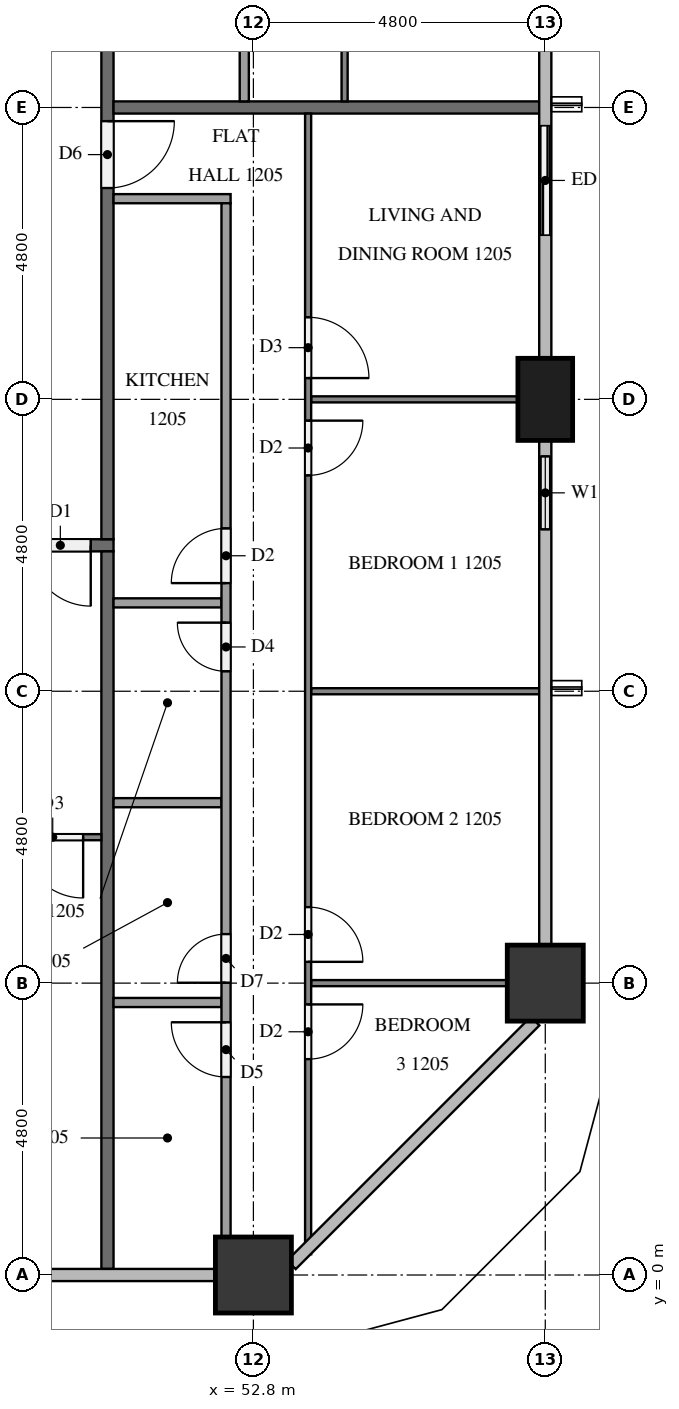
"""IFC4 building model, lengths in metres.
Left out: names, types, materials, properties, quantities, classifications, styles, units other than length and angle.
Written with IfcOpenShell. Run it as: python <this file> out.ifc"""

import sys

from ifc_helpers import new_model, si_unit, direction, frame, frame_2d, origin, origin_2d, place, context, subcontext, project, spatial, rectangle, extrude, element, fill, save


model = new_model("IFC4")
c1 = context("Model", 3, precision=1e-05, world=origin(), true_north=direction((0.0, 1.0)))
c2 = subcontext(c1, "Body", "Model", "MODEL_VIEW")
j1 = project(units=[si_unit("LENGTHUNIT", "METRE"), si_unit("PLANEANGLEUNIT", "RADIAN")], contexts=[c1])
p1 = place(None, origin())
s1 = spatial("IfcSite", under=j1, at=p1, CompositionType="ELEMENT")
p2 = place(p1, origin())
s2 = spatial("IfcBuilding", under=s1, at=p2, CompositionType="ELEMENT")
p3 = place(p2, frame((0.0, 0.0, 50.4)))
s3 = spatial("IfcBuildingStorey", under=s2, at=p3, CompositionType="ELEMENT", Elevation=50.4)
for number, where, z_axis, x_axis in (
    (1, (52.8, 0.0, 0.0), (0.0, 0.0, 1.0), (1.0, 0.0, 0.0)),
    (2, (57.6, 4.8, 0.0), (0.0, 0.0, 1.0), (1.0, 0.0, 0.0)),
):
    element("IfcColumn", number, at=place(p3, frame(where, z_axis=z_axis, x_axis=x_axis)), inside=s3, PredefinedType="COLUMN", context=c2, shape_type="SweptSolid", body=[
        extrude(rectangle(XDim=1.25, YDim=1.25, at=origin_2d()), origin(), (0.0, 0.0, 1.0), 3.1),
    ])
p4 = place(p3, frame((57.6, 14.4, 0.0), z_axis=(0.0, 0.0, 1.0), x_axis=(0.0, 1.0, 0.0)))
e3 = element("IfcColumn", 3, at=p4, inside=s3, PredefinedType="COLUMN", context=c2, shape_type="SweptSolid", body=[
    extrude(rectangle(XDim=1.35, YDim=0.9, at=origin_2d()), origin(), (0.0, 0.0, 1.0), 3.1),
])
p5 = place(p3, frame((57.6, 12.0, 0.0), z_axis=(0.0, 0.0, 1.0), x_axis=(0.0, 1.0, 0.0)))
e4 = element("IfcWall", 4, at=p5, inside=s3, PredefinedType="SOLIDWALL", context=c2, shape_type="SweptSolid", body=[
    extrude(rectangle(XDim=1.725, YDim=0.15, at=frame_2d((0.863, 0.0))), origin(), (0.0, 0.0, 1.0), 3.1),
])
p6 = place(p5, frame((0.262, 0.0, 0.9)))
e5 = element("IfcOpeningElement", 5, at=p6, cuts=e4, PredefinedType="OPENING", context=c2, shape_type="SweptSolid", body=[
    extrude(rectangle(XDim=1.2, YDim=1.4, at=frame_2d((0.6, 0.7))), frame((0.0, 0.085, 0.0), z_axis=(0.0, -1.0, 0.0), x_axis=(1.0, 0.0, 0.0)), (0.0, 0.0, 1.0), 0.17),
])
p7 = place(p3, frame((57.6, 16.8, 0.0), z_axis=(0.0, 0.0, 1.0), x_axis=(0.0, 1.0, 0.0)))
e6 = element("IfcWall", 6, at=p7, inside=s3, PredefinedType="SOLIDWALL", context=c2, shape_type="SweptSolid", body=[
    extrude(rectangle(XDim=2.4, YDim=0.15, at=frame_2d((1.2, 0.0))), origin(), (0.0, 0.0, 1.0), 3.1),
])
p8 = place(p7, frame((0.3, 0.0, 0.0)))
e7 = element("IfcOpeningElement", 7, at=p8, cuts=e6, PredefinedType="OPENING", context=c2, shape_type="SweptSolid", body=[
    extrude(rectangle(XDim=1.8, YDim=2.4, at=frame_2d((0.9, 1.2))), frame((0.0, 0.085, 0.0), z_axis=(0.0, -1.0, 0.0), x_axis=(1.0, 0.0, 0.0)), (0.0, 0.0, 1.0), 0.17),
])
p9 = place(p3, frame((50.5, 12.0, 0.0), z_axis=(0.0, 0.0, 1.0), x_axis=(-1.0, 0.0, 0.0)))
e8 = element("IfcWall", 8, at=p9, inside=s3, PredefinedType="PARTITIONING", context=c2, shape_type="SweptSolid", body=[
    extrude(rectangle(XDim=38.6, YDim=0.2, at=frame_2d((19.3, 0.0))), origin(), (0.0, 0.0, 1.0), 3.1),
])
p10 = place(p9, frame((36.375, 0.0, 0.0)))
e9 = element("IfcOpeningElement", 9, at=p10, cuts=e8, PredefinedType="OPENING", context=c2, shape_type="SweptSolid", body=[
    extrude(rectangle(XDim=1.0, YDim=2.1, at=frame_2d((0.5, 1.05))), frame((0.0, 0.11, 0.0), z_axis=(0.0, -1.0, 0.0), x_axis=(1.0, 0.0, 0.0)), (0.0, 0.0, 1.0), 0.22),
])
p11 = place(p9, frame((19.575, 0.0, 0.0)))
e10 = element("IfcOpeningElement", 10, at=p11, cuts=e8, PredefinedType="OPENING", context=c2, shape_type="SweptSolid", body=[
    extrude(rectangle(XDim=1.0, YDim=2.1, at=frame_2d((0.5, 1.05))), frame((0.0, 0.11, 0.0), z_axis=(0.0, -1.0, 0.0), x_axis=(1.0, 0.0, 0.0)), (0.0, 0.0, 1.0), 0.22),
])
p12 = place(p9, frame((7.575, 0.0, 0.0)))
e11 = element("IfcOpeningElement", 11, at=p12, cuts=e8, PredefinedType="OPENING", context=c2, shape_type="SweptSolid", body=[
    extrude(rectangle(XDim=1.0, YDim=2.1, at=frame_2d((0.5, 1.05))), frame((0.0, 0.11, 0.0), z_axis=(0.0, -1.0, 0.0), x_axis=(1.0, 0.0, 0.0)), (0.0, 0.0, 1.0), 0.22),
])
p13 = place(p9, frame((0.375, 0.0, 0.0)))
e12 = element("IfcOpeningElement", 12, at=p13, cuts=e8, PredefinedType="OPENING", context=c2, shape_type="SweptSolid", body=[
    extrude(rectangle(XDim=1.0, YDim=2.1, at=frame_2d((0.5, 1.05))), frame((0.0, 0.11, 0.0), z_axis=(0.0, -1.0, 0.0), x_axis=(1.0, 0.0, 0.0)), (0.0, 0.0, 1.0), 0.22),
])
p14 = place(p3, frame((50.4, 40.7, 0.0), z_axis=(0.0, 0.0, 1.0), x_axis=(0.0, -1.0, 0.0)))
e13 = element("IfcWall", 13, at=p14, inside=s3, PredefinedType="PARTITIONING", context=c2, shape_type="SweptSolid", body=[
    extrude(rectangle(XDim=28.6, YDim=0.2, at=frame_2d((14.3, 0.0))), origin(), (0.0, 0.0, 1.0), 3.1),
])
p15 = place(p14, frame((21.725, 0.0, 0.0)))
e14 = element("IfcOpeningElement", 14, at=p15, cuts=e13, PredefinedType="OPENING", context=c2, shape_type="SweptSolid", body=[
    extrude(rectangle(XDim=1.1, YDim=2.1, at=frame_2d((0.55, 1.05))), frame((0.0, 0.11, 0.0), z_axis=(0.0, -1.0, 0.0), x_axis=(1.0, 0.0, 0.0)), (0.0, 0.0, 1.0), 0.22),
])
p16 = place(p14, frame((12.175, 0.0, 0.0)))
e15 = element("IfcOpeningElement", 15, at=p16, cuts=e13, PredefinedType="OPENING", context=c2, shape_type="SweptSolid", body=[
    extrude(rectangle(XDim=1.0, YDim=2.1, at=frame_2d((0.5, 1.05))), frame((0.0, 0.11, 0.0), z_axis=(0.0, -1.0, 0.0), x_axis=(1.0, 0.0, 0.0)), (0.0, 0.0, 1.0), 0.22),
])
p17 = place(p14, frame((10.625, 0.0, 0.0)))
e16 = element("IfcOpeningElement", 16, at=p17, cuts=e13, PredefinedType="OPENING", context=c2, shape_type="SweptSolid", body=[
    extrude(rectangle(XDim=1.0, YDim=2.1, at=frame_2d((0.5, 1.05))), frame((0.0, 0.11, 0.0), z_axis=(0.0, -1.0, 0.0), x_axis=(1.0, 0.0, 0.0)), (0.0, 0.0, 1.0), 0.22),
])
p18 = place(p3, frame((50.4, 11.9, 0.0), z_axis=(0.0, 0.0, 1.0), x_axis=(0.0, -1.0, 0.0)))
e17 = element("IfcWall", 17, at=p18, inside=s3, PredefinedType="PARTITIONING", context=c2, shape_type="SweptSolid", body=[
    extrude(rectangle(XDim=11.8, YDim=0.2, at=frame_2d((5.9, 0.0))), origin(), (0.0, 0.0, 1.0), 3.1),
])
p19 = place(p3, frame((50.5, 19.2, 0.0), z_axis=(0.0, 0.0, 1.0), x_axis=(1.0, 0.0, 0.0)))
e18 = element("IfcWall", 18, at=p19, inside=s3, PredefinedType="PARTITIONING", context=c2, shape_type="SweptSolid", body=[
    extrude(rectangle(XDim=7.0, YDim=0.2, at=frame_2d((3.5, 0.0))), origin(), (0.0, 0.0, 1.0), 3.1),
])
p20 = place(p3, frame((50.3, 7.2, 0.0), z_axis=(0.0, 0.0, 1.0), x_axis=(-1.0, 0.0, 0.0)))
e19 = element("IfcWall", 19, at=p20, inside=s3, PredefinedType="PARTITIONING", context=c2, shape_type="SweptSolid", body=[
    extrude(rectangle(XDim=7.0, YDim=0.1, at=frame_2d((3.5, 0.0))), origin(), (0.0, 0.0, 1.0), 3.1),
])
p21 = place(p20, frame((0.3, 0.0, 0.0)))
e20 = element("IfcOpeningElement", 20, at=p21, cuts=e19, PredefinedType="OPENING", context=c2, shape_type="SweptSolid", body=[
    extrude(rectangle(XDim=1.0, YDim=2.1, at=frame_2d((0.5, 1.05))), frame((0.0, 0.06, 0.0), z_axis=(0.0, -1.0, 0.0), x_axis=(1.0, 0.0, 0.0)), (0.0, 0.0, 1.0), 0.12),
])
p22 = place(p3, frame((53.75, 14.4, 0.0), z_axis=(0.0, 0.0, 1.0), x_axis=(1.0, 0.0, 0.0)))
e21 = element("IfcWall", 21, at=p22, inside=s3, PredefinedType="PARTITIONING", context=c2, shape_type="SweptSolid", body=[
    extrude(rectangle(XDim=3.4, YDim=0.1, at=frame_2d((1.7, 0.0))), origin(), (0.0, 0.0, 1.0), 3.1),
])
p23 = place(p3, frame((53.75, 9.6, 0.0), z_axis=(0.0, 0.0, 1.0), x_axis=(1.0, 0.0, 0.0)))
e22 = element("IfcWall", 22, at=p23, inside=s3, PredefinedType="PARTITIONING", context=c2, shape_type="SweptSolid", body=[
    extrude(rectangle(XDim=3.75, YDim=0.1, at=frame_2d((1.875, 0.0))), origin(), (0.0, 0.0, 1.0), 3.1),
])
p24 = place(p3, frame((53.75, 4.8, 0.0), z_axis=(0.0, 0.0, 1.0), x_axis=(1.0, 0.0, 0.0)))
e23 = element("IfcWall", 23, at=p24, inside=s3, PredefinedType="PARTITIONING", context=c2, shape_type="SweptSolid", body=[
    extrude(rectangle(XDim=3.225, YDim=0.1, at=frame_2d((1.613, 0.0))), origin(), (0.0, 0.0, 1.0), 3.1),
])
p25 = place(p3, frame((53.7, 19.1, 0.0), z_axis=(0.0, 0.0, 1.0), x_axis=(0.0, -1.0, 0.0)))
e24 = element("IfcWall", 24, at=p25, inside=s3, PredefinedType="PARTITIONING", context=c2, shape_type="SweptSolid", body=[
    extrude(rectangle(XDim=18.759, YDim=0.1, at=frame_2d((9.379, 0.0))), origin(), (0.0, 0.0, 1.0), 3.1),
])
p26 = place(p25, frame((3.35, 0.0, 0.0)))
e25 = element("IfcOpeningElement", 25, at=p26, cuts=e24, PredefinedType="OPENING", context=c2, shape_type="SweptSolid", body=[
    extrude(rectangle(XDim=1.0, YDim=2.1, at=frame_2d((0.5, 1.05))), frame((0.0, 0.06, 0.0), z_axis=(0.0, -1.0, 0.0), x_axis=(1.0, 0.0, 0.0)), (0.0, 0.0, 1.0), 0.12),
])
p27 = place(p25, frame((5.05, 0.0, 0.0)))
e26 = element("IfcOpeningElement", 26, at=p27, cuts=e24, PredefinedType="OPENING", context=c2, shape_type="SweptSolid", body=[
    extrude(rectangle(XDim=0.9, YDim=2.1, at=frame_2d((0.45, 1.05))), frame((0.0, 0.06, 0.0), z_axis=(0.0, -1.0, 0.0), x_axis=(1.0, 0.0, 0.0)), (0.0, 0.0, 1.0), 0.12),
])
p28 = place(p25, frame((13.05, 0.0, 0.0)))
e27 = element("IfcOpeningElement", 27, at=p28, cuts=e24, PredefinedType="OPENING", context=c2, shape_type="SweptSolid", body=[
    extrude(rectangle(XDim=0.9, YDim=2.1, at=frame_2d((0.45, 1.05))), frame((0.0, 0.06, 0.0), z_axis=(0.0, -1.0, 0.0), x_axis=(1.0, 0.0, 0.0)), (0.0, 0.0, 1.0), 0.12),
])
p29 = place(p25, frame((14.65, 0.0, 0.0)))
e28 = element("IfcOpeningElement", 28, at=p29, cuts=e24, PredefinedType="OPENING", context=c2, shape_type="SweptSolid", body=[
    extrude(rectangle(XDim=0.9, YDim=2.1, at=frame_2d((0.45, 1.05))), frame((0.0, 0.06, 0.0), z_axis=(0.0, -1.0, 0.0), x_axis=(1.0, 0.0, 0.0)), (0.0, 0.0, 1.0), 0.12),
])
for number, where, z_axis, x_axis in (
    (29, (50.5, 11.053, 0.0), (0.0, 0.0, 1.0), (1.0, 0.0, 0.0)),
    (30, (50.5, 7.767, 0.0), (0.0, 0.0, 1.0), (1.0, 0.0, 0.0)),
    (31, (50.5, 4.481, 0.0), (0.0, 0.0, 1.0), (1.0, 0.0, 0.0)),
):
    element("IfcWall", number, at=place(p3, frame(where, z_axis=z_axis, x_axis=x_axis)), inside=s3, PredefinedType="PARTITIONING", context=c2, shape_type="SweptSolid", body=[
        extrude(rectangle(XDim=1.775, YDim=0.15, at=frame_2d((0.887, 0.0))), origin(), (0.0, 0.0, 1.0), 3.1),
    ])
p30 = place(p3, frame((50.5, 17.7, 0.0), z_axis=(0.0, 0.0, 1.0), x_axis=(1.0, 0.0, 0.0)))
e32 = element("IfcWall", 32, at=p30, inside=s3, PredefinedType="PARTITIONING", context=c2, shape_type="SweptSolid", body=[
    extrude(rectangle(XDim=1.925, YDim=0.15, at=frame_2d((0.962, 0.0))), origin(), (0.0, 0.0, 1.0), 3.1),
])
p31 = place(p3, frame((52.35, 0.625, 0.0), z_axis=(0.0, 0.0, 1.0), x_axis=(0.0, 1.0, 0.0)))
e33 = element("IfcWall", 33, at=p31, inside=s3, PredefinedType="PARTITIONING", context=c2, shape_type="SweptSolid", body=[
    extrude(rectangle(XDim=17.0, YDim=0.15, at=frame_2d((8.5, 0.0))), origin(), (0.0, 0.0, 1.0), 3.1),
])
p32 = place(p31, frame((10.753, 0.0, 0.0)))
e34 = element("IfcOpeningElement", 34, at=p32, cuts=e33, PredefinedType="OPENING", context=c2, shape_type="SweptSolid", body=[
    extrude(rectangle(XDim=0.9, YDim=2.1, at=frame_2d((0.45, 1.05))), frame((0.0, 0.085, 0.0), z_axis=(0.0, -1.0, 0.0), x_axis=(1.0, 0.0, 0.0)), (0.0, 0.0, 1.0), 0.17),
])
p33 = place(p31, frame((9.303, 0.0, 0.0)))
e35 = element("IfcOpeningElement", 35, at=p33, cuts=e33, PredefinedType="OPENING", context=c2, shape_type="SweptSolid", body=[
    extrude(rectangle(XDim=0.8, YDim=2.1, at=frame_2d((0.4, 1.05))), frame((0.0, 0.085, 0.0), z_axis=(0.0, -1.0, 0.0), x_axis=(1.0, 0.0, 0.0)), (0.0, 0.0, 1.0), 0.17),
])
p34 = place(p31, frame((4.181, 0.0, 0.0)))
e36 = element("IfcOpeningElement", 36, at=p34, cuts=e33, PredefinedType="OPENING", context=c2, shape_type="SweptSolid", body=[
    extrude(rectangle(XDim=0.8, YDim=2.1, at=frame_2d((0.4, 1.05))), frame((0.0, 0.085, 0.0), z_axis=(0.0, -1.0, 0.0), x_axis=(1.0, 0.0, 0.0)), (0.0, 0.0, 1.0), 0.17),
])
p35 = place(p31, frame((2.631, 0.0, 0.0)))
e37 = element("IfcOpeningElement", 37, at=p35, cuts=e33, PredefinedType="OPENING", context=c2, shape_type="SweptSolid", body=[
    extrude(rectangle(XDim=0.9, YDim=2.1, at=frame_2d((0.45, 1.05))), frame((0.0, 0.085, 0.0), z_axis=(0.0, -1.0, 0.0), x_axis=(1.0, 0.0, 0.0)), (0.0, 0.0, 1.0), 0.17),
])
p36 = place(p3, frame((54.3, 28.7, 0.0), z_axis=(0.0, 0.0, 1.0), x_axis=(0.0, -1.0, 0.0)))
e38 = element("IfcWall", 38, at=p36, inside=s3, PredefinedType="PARTITIONING", context=c2, shape_type="SweptSolid", body=[
    extrude(rectangle(XDim=9.4, YDim=0.1, at=frame_2d((4.7, 0.0))), origin(), (0.0, 0.0, 1.0), 3.1),
])
p37 = place(p36, frame((3.35, 0.0, 0.0)))
e39 = element("IfcOpeningElement", 39, at=p37, cuts=e38, PredefinedType="OPENING", context=c2, shape_type="SweptSolid", body=[
    extrude(rectangle(XDim=1.0, YDim=2.1, at=frame_2d((0.5, 1.05))), frame((0.0, 0.06, 0.0), z_axis=(0.0, -1.0, 0.0), x_axis=(1.0, 0.0, 0.0)), (0.0, 0.0, 1.0), 0.12),
])
p38 = place(p36, frame((5.05, 0.0, 0.0)))
e40 = element("IfcOpeningElement", 40, at=p38, cuts=e38, PredefinedType="OPENING", context=c2, shape_type="SweptSolid", body=[
    extrude(rectangle(XDim=0.9, YDim=2.1, at=frame_2d((0.45, 1.05))), frame((0.0, 0.06, 0.0), z_axis=(0.0, -1.0, 0.0), x_axis=(1.0, 0.0, 0.0)), (0.0, 0.0, 1.0), 0.12),
])
p39 = place(p3, frame((52.65, 19.3, 0.0), z_axis=(0.0, 0.0, 1.0), x_axis=(0.0, 1.0, 0.0)))
e41 = element("IfcWall", 41, at=p39, inside=s3, PredefinedType="PARTITIONING", context=c2, shape_type="SweptSolid", body=[
    extrude(rectangle(XDim=7.925, YDim=0.15, at=frame_2d((3.962, 0.0))), origin(), (0.0, 0.0, 1.0), 3.1),
])
p40 = place(p39, frame((3.495, 0.0, 0.0)))
e42 = element("IfcOpeningElement", 42, at=p40, cuts=e41, PredefinedType="OPENING", context=c2, shape_type="SweptSolid", body=[
    extrude(rectangle(XDim=0.9, YDim=2.1, at=frame_2d((0.45, 1.05))), frame((0.0, 0.085, 0.0), z_axis=(0.0, -1.0, 0.0), x_axis=(1.0, 0.0, 0.0)), (0.0, 0.0, 1.0), 0.17),
])
p41 = place(p39, frame((2.045, 0.0, 0.0)))
e43 = element("IfcOpeningElement", 43, at=p41, cuts=e41, PredefinedType="OPENING", context=c2, shape_type="SweptSolid", body=[
    extrude(rectangle(XDim=0.8, YDim=2.1, at=frame_2d((0.4, 1.05))), frame((0.0, 0.085, 0.0), z_axis=(0.0, -1.0, 0.0), x_axis=(1.0, 0.0, 0.0)), (0.0, 0.0, 1.0), 0.17),
])
p42 = place(p6, origin())
e44 = element("IfcWindow", 44, at=p42, inside=s3, PartitioningType="SINGLE_PANEL", PredefinedType="WINDOW", context=c2, shape_type="SweptSolid", body=[
    extrude(rectangle(XDim=1.2, YDim=1.4, at=frame_2d((0.6, 0.7))), frame((0.0, 0.03, 0.0), z_axis=(0.0, -1.0, 0.0), x_axis=(1.0, 0.0, 0.0)), (0.0, 0.0, 1.0), 0.06),
])
fill(e5, e44)
p43 = place(p8, origin())
e45 = element("IfcDoor", 45, at=p43, inside=s3, OperationType="SLIDING_TO_RIGHT", PredefinedType="DOOR", context=c2, shape_type="SweptSolid", body=[
    extrude(rectangle(XDim=1.8, YDim=2.4, at=frame_2d((0.9, 1.2))), frame((0.0, 0.025, 0.0), z_axis=(0.0, -1.0, 0.0), x_axis=(1.0, 0.0, 0.0)), (0.0, 0.0, 1.0), 0.05),
])
fill(e7, e45)
p44 = place(p13, origin())
e46 = element("IfcDoor", 46, at=p44, inside=s3, OperationType="SINGLE_SWING_LEFT", PredefinedType="DOOR", context=c2, shape_type="SweptSolid", body=[
    extrude(rectangle(XDim=1.0, YDim=2.1, at=frame_2d((0.5, 1.05))), frame((0.0, 0.025, 0.0), z_axis=(0.0, -1.0, 0.0), x_axis=(1.0, 0.0, 0.0)), (0.0, 0.0, 1.0), 0.05),
])
fill(e12, e46)
p45 = place(p15, origin())
e47 = element("IfcDoor", 47, at=p45, inside=s3, OperationType="SINGLE_SWING_LEFT", PredefinedType="DOOR", context=c2, shape_type="SweptSolid", body=[
    extrude(rectangle(XDim=1.1, YDim=2.1, at=frame_2d((0.55, 1.05))), frame((0.0, 0.025, 0.0), z_axis=(0.0, -1.0, 0.0), x_axis=(1.0, 0.0, 0.0)), (0.0, 0.0, 1.0), 0.05),
])
fill(e14, e47)
p46 = place(p21, origin())
e48 = element("IfcDoor", 48, at=p46, inside=s3, OperationType="SINGLE_SWING_LEFT", PredefinedType="DOOR", context=c2, shape_type="SweptSolid", body=[
    extrude(rectangle(XDim=1.0, YDim=2.1, at=frame_2d((0.5, 1.05))), frame((0.0, 0.025, 0.0), z_axis=(0.0, -1.0, 0.0), x_axis=(1.0, 0.0, 0.0)), (0.0, 0.0, 1.0), 0.05),
])
fill(e20, e48)
p47 = place(p26, origin())
e49 = element("IfcDoor", 49, at=p47, inside=s3, OperationType="SINGLE_SWING_RIGHT", PredefinedType="DOOR", context=c2, shape_type="SweptSolid", body=[
    extrude(rectangle(XDim=1.0, YDim=2.1, at=frame_2d((0.5, 1.05))), frame((0.0, 0.025, 0.0), z_axis=(0.0, -1.0, 0.0), x_axis=(1.0, 0.0, 0.0)), (0.0, 0.0, 1.0), 0.05),
])
fill(e25, e49)
p48 = place(p27, origin())
e50 = element("IfcDoor", 50, at=p48, inside=s3, OperationType="SINGLE_SWING_LEFT", PredefinedType="DOOR", context=c2, shape_type="SweptSolid", body=[
    extrude(rectangle(XDim=0.9, YDim=2.1, at=frame_2d((0.45, 1.05))), frame((0.0, 0.025, 0.0), z_axis=(0.0, -1.0, 0.0), x_axis=(1.0, 0.0, 0.0)), (0.0, 0.0, 1.0), 0.05),
])
fill(e26, e50)
p49 = place(p28, origin())
e51 = element("IfcDoor", 51, at=p49, inside=s3, OperationType="SINGLE_SWING_RIGHT", PredefinedType="DOOR", context=c2, shape_type="SweptSolid", body=[
    extrude(rectangle(XDim=0.9, YDim=2.1, at=frame_2d((0.45, 1.05))), frame((0.0, 0.025, 0.0), z_axis=(0.0, -1.0, 0.0), x_axis=(1.0, 0.0, 0.0)), (0.0, 0.0, 1.0), 0.05),
])
fill(e27, e51)
p50 = place(p29, origin())
e52 = element("IfcDoor", 52, at=p50, inside=s3, OperationType="SINGLE_SWING_LEFT", PredefinedType="DOOR", context=c2, shape_type="SweptSolid", body=[
    extrude(rectangle(XDim=0.9, YDim=2.1, at=frame_2d((0.45, 1.05))), frame((0.0, 0.025, 0.0), z_axis=(0.0, -1.0, 0.0), x_axis=(1.0, 0.0, 0.0)), (0.0, 0.0, 1.0), 0.05),
])
fill(e28, e52)
p51 = place(p32, origin())
e53 = element("IfcDoor", 53, at=p51, inside=s3, OperationType="SINGLE_SWING_LEFT", PredefinedType="DOOR", context=c2, shape_type="SweptSolid", body=[
    extrude(rectangle(XDim=0.9, YDim=2.1, at=frame_2d((0.45, 1.05))), frame((0.0, 0.025, 0.0), z_axis=(0.0, -1.0, 0.0), x_axis=(1.0, 0.0, 0.0)), (0.0, 0.0, 1.0), 0.05),
])
fill(e34, e53)
p52 = place(p33, origin())
e54 = element("IfcDoor", 54, at=p52, inside=s3, OperationType="SINGLE_SWING_RIGHT", PredefinedType="DOOR", context=c2, shape_type="SweptSolid", body=[
    extrude(rectangle(XDim=0.8, YDim=2.1, at=frame_2d((0.4, 1.05))), frame((0.0, 0.025, 0.0), z_axis=(0.0, -1.0, 0.0), x_axis=(1.0, 0.0, 0.0)), (0.0, 0.0, 1.0), 0.05),
])
fill(e35, e54)
p53 = place(p34, origin())
e55 = element("IfcDoor", 55, at=p53, inside=s3, OperationType="SINGLE_SWING_LEFT", PredefinedType="DOOR", context=c2, shape_type="SweptSolid", body=[
    extrude(rectangle(XDim=0.8, YDim=2.1, at=frame_2d((0.4, 1.05))), frame((0.0, 0.025, 0.0), z_axis=(0.0, -1.0, 0.0), x_axis=(1.0, 0.0, 0.0)), (0.0, 0.0, 1.0), 0.05),
])
fill(e36, e55)
p54 = place(p35, origin())
e56 = element("IfcDoor", 56, at=p54, inside=s3, OperationType="SINGLE_SWING_RIGHT", PredefinedType="DOOR", context=c2, shape_type="SweptSolid", body=[
    extrude(rectangle(XDim=0.9, YDim=2.1, at=frame_2d((0.45, 1.05))), frame((0.0, 0.025, 0.0), z_axis=(0.0, -1.0, 0.0), x_axis=(1.0, 0.0, 0.0)), (0.0, 0.0, 1.0), 0.05),
])
fill(e37, e56)
save(model, sys.argv[1])
